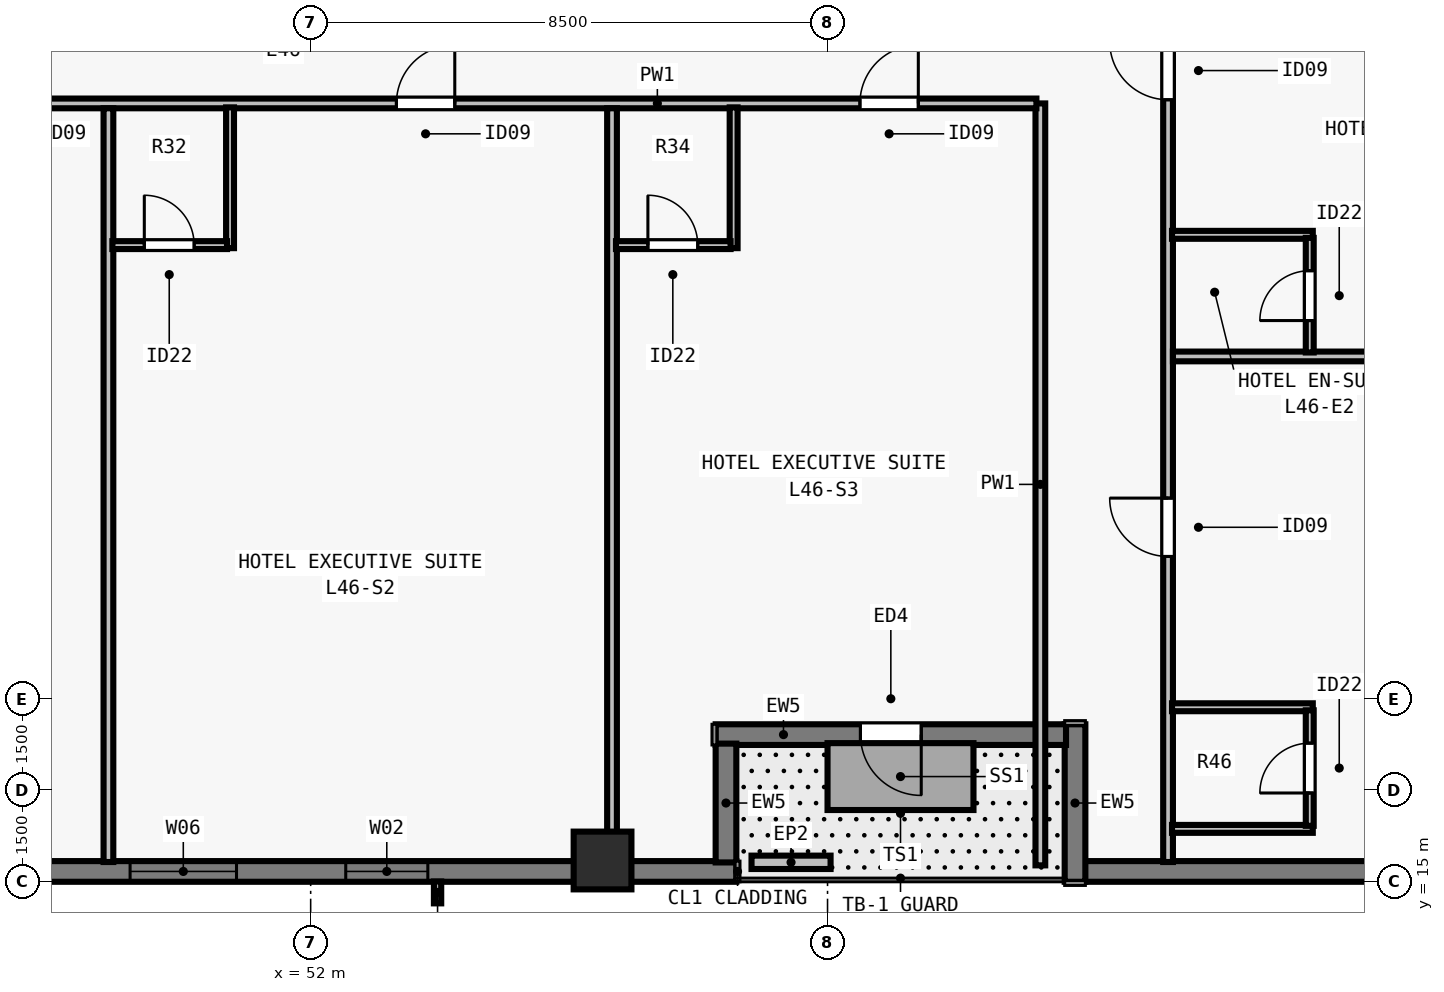
"""IFC4 building model, lengths in metres.
Left out: names, types, materials, properties, quantities, classifications, styles, units other than length and angle.
Written with IfcOpenShell. Run it as: python <this file> out.ifc"""

import sys

from ifc_helpers import new_model, si_unit, direction, frame, frame_2d, origin, origin_2d, place, context, subcontext, project, spatial, rectangle, extrude, element, fill, save


model = new_model("IFC4")
c1 = context("Model", 3, precision=1e-05, world=origin(), true_north=direction((0.0, 1.0)))
c2 = subcontext(c1, "Body", "Model", "MODEL_VIEW")
j1 = project(units=[si_unit("LENGTHUNIT", "METRE"), si_unit("PLANEANGLEUNIT", "RADIAN")], contexts=[c1])
p1 = place(None, origin())
s1 = spatial("IfcSite", under=j1, at=p1, CompositionType="ELEMENT")
p2 = place(p1, origin())
s2 = spatial("IfcBuilding", under=s1, at=p2, CompositionType="ELEMENT")
p3 = place(p2, frame((0.0, 0.0, 169.0)))
s3 = spatial("IfcBuildingStorey", under=s2, at=p3, CompositionType="ELEMENT", Elevation=169.0)
p4 = place(p3, frame((56.8, 15.35, 0.0), z_axis=(0.0, 0.0, 1.0), x_axis=(1.0, 0.0, 0.0)))
e1 = element("IfcColumn", 1, at=p4, inside=s3, PredefinedType="COLUMN", context=c2, shape_type="SweptSolid", body=[
    extrude(rectangle(XDim=0.95, YDim=0.95, at=origin_2d()), origin(), (0.0, 0.0, 1.0), 3.5),
])
p5 = place(p3, frame((59.0, 15.17, 0.0), z_axis=(0.0, 0.0, 1.0), x_axis=(-1.0, 0.0, 0.0)))
e2 = element("IfcWall", 2, at=p5, inside=s3, PredefinedType="SOLIDWALL", context=c2, shape_type="SweptSolid", body=[
    extrude(rectangle(XDim=26.682, YDim=0.34, at=frame_2d((13.341, 0.0))), origin(), (0.0, 0.0, 1.0), 3.28),
])
p6 = place(p5, frame((5.073, 0.0, 0.8)))
e3 = element("IfcOpeningElement", 3, at=p6, cuts=e2, PredefinedType="OPENING", context=c2, shape_type="SweptSolid", body=[
    extrude(rectangle(XDim=1.35, YDim=1.66, at=frame_2d((0.675, 0.83))), frame((0.0, 0.18, 0.0), z_axis=(0.0, -1.0, 0.0), x_axis=(1.0, 0.0, 0.0)), (0.0, 0.0, 1.0), 0.36),
])
p7 = place(p5, frame((8.219, 0.0, 0.8)))
e4 = element("IfcOpeningElement", 4, at=p7, cuts=e2, PredefinedType="OPENING", context=c2, shape_type="SweptSolid", body=[
    extrude(rectangle(XDim=1.75, YDim=1.66, at=frame_2d((0.875, 0.83))), frame((0.0, 0.18, 0.0), z_axis=(0.0, -1.0, 0.0), x_axis=(1.0, 0.0, 0.0)), (0.0, 0.0, 1.0), 0.36),
])
p8 = place(p5, frame((12.666, 0.0, 0.8)))
e5 = element("IfcOpeningElement", 5, at=p8, cuts=e2, PredefinedType="OPENING", context=c2, shape_type="SweptSolid", body=[
    extrude(rectangle(XDim=1.35, YDim=1.66, at=frame_2d((0.675, 0.83))), frame((0.0, 0.18, 0.0), z_axis=(0.0, -1.0, 0.0), x_axis=(1.0, 0.0, 0.0)), (0.0, 0.0, 1.0), 0.36),
])
p9 = place(p5, frame((15.012, 0.0, 0.8)))
e6 = element("IfcOpeningElement", 6, at=p9, cuts=e2, PredefinedType="OPENING", context=c2, shape_type="SweptSolid", body=[
    extrude(rectangle(XDim=1.75, YDim=1.66, at=frame_2d((0.875, 0.83))), frame((0.0, 0.18, 0.0), z_axis=(0.0, -1.0, 0.0), x_axis=(1.0, 0.0, 0.0)), (0.0, 0.0, 1.0), 0.36),
])
p10 = place(p5, frame((19.809, 0.0, 0.8)))
e7 = element("IfcOpeningElement", 7, at=p10, cuts=e2, PredefinedType="OPENING", context=c2, shape_type="SweptSolid", body=[
    extrude(rectangle(XDim=1.35, YDim=1.66, at=frame_2d((0.675, 0.83))), frame((0.0, 0.18, 0.0), z_axis=(0.0, -1.0, 0.0), x_axis=(1.0, 0.0, 0.0)), (0.0, 0.0, 1.0), 0.36),
])
p11 = place(p3, frame((72.0, 15.17, 0.0), z_axis=(0.0, 0.0, 1.0), x_axis=(-1.0, 0.0, 0.0)))
e8 = element("IfcWall", 8, at=p11, inside=s3, PredefinedType="SOLIDWALL", context=c2, shape_type="SweptSolid", body=[
    extrude(rectangle(XDim=7.282, YDim=0.34, at=frame_2d((3.641, 0.0))), origin(), (0.0, 0.0, 1.0), 3.28),
])
p12 = place(p3, frame((64.57, 15.0, 0.0), z_axis=(0.0, 0.0, 1.0), x_axis=(0.0, 1.0, 0.0)))
e9 = element("IfcWall", 9, at=p12, inside=s3, PredefinedType="SOLIDWALL", context=c2, shape_type="SweptSolid", body=[
    extrude(rectangle(XDim=2.59, YDim=0.34, at=frame_2d((1.295, 0.0))), origin(), (0.0, 0.0, 1.0), 3.28),
])
p13 = place(p3, frame((64.422, 17.42, 0.0), z_axis=(0.0, 0.0, 1.0), x_axis=(-1.0, 0.0, 0.0)))
e10 = element("IfcWall", 10, at=p13, inside=s3, PredefinedType="SOLIDWALL", context=c2, shape_type="SweptSolid", body=[
    extrude(rectangle(XDim=5.762, YDim=0.34, at=frame_2d((2.881, 0.0))), origin(), (0.0, 0.0, 1.0), 3.28),
])
p14 = place(p13, frame((2.381, 0.0, 0.0)))
e11 = element("IfcOpeningElement", 11, at=p14, cuts=e10, PredefinedType="OPENING", context=c2, shape_type="SweptSolid", body=[
    extrude(rectangle(XDim=1.0, YDim=2.15, at=frame_2d((0.5, 1.075))), frame((0.0, 0.18, 0.0), z_axis=(0.0, -1.0, 0.0), x_axis=(1.0, 0.0, 0.0)), (0.0, 0.0, 1.0), 0.36),
])
p15 = place(p3, frame((58.83, 17.272, 0.0), z_axis=(0.0, 0.0, 1.0), x_axis=(0.0, -1.0, 0.0)))
e12 = element("IfcWall", 12, at=p15, inside=s3, PredefinedType="SOLIDWALL", context=c2, shape_type="SweptSolid", body=[
    extrude(rectangle(XDim=1.954, YDim=0.34, at=frame_2d((0.977, 0.0))), origin(), (0.0, 0.0, 1.0), 3.28),
])
p16 = place(p3, frame((59.25, 15.32, 0.0), z_axis=(0.0, 0.0, 1.0), x_axis=(1.0, 0.0, 0.0)))
e13 = element("IfcWall", 13, at=p16, inside=s3, PredefinedType="PARAPET", context=c2, shape_type="SweptSolid", body=[
    extrude(rectangle(XDim=1.3, YDim=0.22, at=frame_2d((0.65, 0.0))), origin(), (0.0, 0.0, 1.0), 0.55),
])
p17 = place(p3, frame((66.1, 15.325, 0.0), z_axis=(0.0, 0.0, 1.0), x_axis=(0.0, 1.0, 0.0)))
e14 = element("IfcWall", 14, at=p17, inside=s3, PredefinedType="PARTITIONING", context=c2, shape_type="SweptSolid", body=[
    extrude(rectangle(XDim=47.35, YDim=0.16, at=frame_2d((23.675, 0.0))), origin(), (0.0, 0.0, 1.0), 2.555),
])
p18 = place(p17, frame((5.025, 0.0, 0.0)))
e15 = element("IfcOpeningElement", 15, at=p18, cuts=e14, PredefinedType="OPENING", context=c2, shape_type="SweptSolid", body=[
    extrude(rectangle(XDim=0.96, YDim=2.15, at=frame_2d((0.48, 1.075))), frame((0.0, 0.09, 0.0), z_axis=(0.0, -1.0, 0.0), x_axis=(1.0, 0.0, 0.0)), (0.0, 0.0, 1.0), 0.18),
])
p19 = place(p17, frame((12.535, 0.0, 0.0)))
e16 = element("IfcOpeningElement", 16, at=p19, cuts=e14, PredefinedType="OPENING", context=c2, shape_type="SweptSolid", body=[
    extrude(rectangle(XDim=0.96, YDim=2.15, at=frame_2d((0.48, 1.075))), frame((0.0, 0.09, 0.0), z_axis=(0.0, -1.0, 0.0), x_axis=(1.0, 0.0, 0.0)), (0.0, 0.0, 1.0), 0.18),
])
p20 = place(p17, frame((20.395, 0.0, 0.0)))
e17 = element("IfcOpeningElement", 17, at=p20, cuts=e14, PredefinedType="OPENING", context=c2, shape_type="SweptSolid", body=[
    extrude(rectangle(XDim=0.96, YDim=2.15, at=frame_2d((0.48, 1.075))), frame((0.0, 0.09, 0.0), z_axis=(0.0, -1.0, 0.0), x_axis=(1.0, 0.0, 0.0)), (0.0, 0.0, 1.0), 0.18),
])
p21 = place(p17, frame((28.255, 0.0, 0.0)))
e18 = element("IfcOpeningElement", 18, at=p21, cuts=e14, PredefinedType="OPENING", context=c2, shape_type="SweptSolid", body=[
    extrude(rectangle(XDim=0.96, YDim=2.15, at=frame_2d((0.48, 1.075))), frame((0.0, 0.09, 0.0), z_axis=(0.0, -1.0, 0.0), x_axis=(1.0, 0.0, 0.0)), (0.0, 0.0, 1.0), 0.18),
])
p22 = place(p17, frame((36.115, 0.0, 0.0)))
e19 = element("IfcOpeningElement", 19, at=p22, cuts=e14, PredefinedType="OPENING", context=c2, shape_type="SweptSolid", body=[
    extrude(rectangle(XDim=0.96, YDim=2.15, at=frame_2d((0.48, 1.075))), frame((0.0, 0.09, 0.0), z_axis=(0.0, -1.0, 0.0), x_axis=(1.0, 0.0, 0.0)), (0.0, 0.0, 1.0), 0.18),
])
p23 = place(p17, frame((44.1, 0.0, 0.0)))
e20 = element("IfcOpeningElement", 20, at=p23, cuts=e14, PredefinedType="OPENING", context=c2, shape_type="SweptSolid", body=[
    extrude(rectangle(XDim=0.96, YDim=2.15, at=frame_2d((0.48, 1.075))), frame((0.0, 0.09, 0.0), z_axis=(0.0, -1.0, 0.0), x_axis=(1.0, 0.0, 0.0)), (0.0, 0.0, 1.0), 0.18),
])
p24 = place(p3, frame((64.0, 15.27, 0.0), z_axis=(0.0, 0.0, 1.0), x_axis=(0.0, 1.0, 0.0)))
e21 = element("IfcWall", 21, at=p24, inside=s3, PredefinedType="PARTITIONING", context=c2, shape_type="SweptSolid", body=[
    extrude(rectangle(XDim=12.53, YDim=0.16, at=frame_2d((6.265, 0.0))), origin(), (0.0, 0.0, 1.0), 2.555),
])
p25 = place(p3, frame((41.865, 27.8, 0.0), z_axis=(0.0, 0.0, 1.0), x_axis=(1.0, 0.0, 0.0)))
e22 = element("IfcWall", 22, at=p25, inside=s3, PredefinedType="PARTITIONING", context=c2, shape_type="SweptSolid", body=[
    extrude(rectangle(XDim=22.07, YDim=0.16, at=frame_2d((11.035, 0.0))), origin(), (0.0, 0.0, 1.0), 3.28),
])
p26 = place(p25, frame((4.232, 0.0, 0.0)))
e23 = element("IfcOpeningElement", 23, at=p26, cuts=e22, PredefinedType="OPENING", context=c2, shape_type="SweptSolid", body=[
    extrude(rectangle(XDim=0.96, YDim=2.15, at=frame_2d((0.48, 1.075))), frame((0.0, 0.09, 0.0), z_axis=(0.0, -1.0, 0.0), x_axis=(1.0, 0.0, 0.0)), (0.0, 0.0, 1.0), 0.18),
])
p27 = place(p25, frame((11.545, 0.0, 0.0)))
e24 = element("IfcOpeningElement", 24, at=p27, cuts=e22, PredefinedType="OPENING", context=c2, shape_type="SweptSolid", body=[
    extrude(rectangle(XDim=0.96, YDim=2.15, at=frame_2d((0.48, 1.075))), frame((0.0, 0.09, 0.0), z_axis=(0.0, -1.0, 0.0), x_axis=(1.0, 0.0, 0.0)), (0.0, 0.0, 1.0), 0.18),
])
p28 = place(p25, frame((19.168, 0.0, 0.0)))
e25 = element("IfcOpeningElement", 25, at=p28, cuts=e22, PredefinedType="OPENING", context=c2, shape_type="SweptSolid", body=[
    extrude(rectangle(XDim=0.96, YDim=2.15, at=frame_2d((0.48, 1.075))), frame((0.0, 0.09, 0.0), z_axis=(0.0, -1.0, 0.0), x_axis=(1.0, 0.0, 0.0)), (0.0, 0.0, 1.0), 0.18),
])
p29 = place(p3, frame((48.674, 15.325, 0.0), z_axis=(0.0, 0.0, 1.0), x_axis=(0.0, 1.0, 0.0)))
e26 = element("IfcWall", 26, at=p29, inside=s3, PredefinedType="PARTITIONING", context=c2, shape_type="SweptSolid", body=[
    extrude(rectangle(XDim=12.395, YDim=0.16, at=frame_2d((6.198, 0.0))), origin(), (0.0, 0.0, 1.0), 2.896),
])
p30 = place(p3, frame((50.674, 25.42, 0.0), z_axis=(0.0, 0.0, 1.0), x_axis=(0.0, 1.0, 0.0)))
e27 = element("IfcWall", 27, at=p30, inside=s3, PredefinedType="PLUMBINGWALL", context=c2, shape_type="SweptSolid", body=[
    extrude(rectangle(XDim=2.315, YDim=0.13, at=frame_2d((1.158, 0.0))), origin(), (0.0, 0.0, 1.0), 3.28),
])
p31 = place(p3, frame((48.739, 25.47, 0.0), z_axis=(0.0, 0.0, 1.0), x_axis=(1.0, 0.0, 0.0)))
e28 = element("IfcWall", 28, at=p31, inside=s3, PredefinedType="PLUMBINGWALL", context=c2, shape_type="SweptSolid", body=[
    extrude(rectangle(XDim=1.885, YDim=0.13, at=frame_2d((0.942, 0.0))), origin(), (0.0, 0.0, 1.0), 3.28),
])
p32 = place(p31, frame((0.525, 0.0, 0.0)))
e29 = element("IfcOpeningElement", 29, at=p32, cuts=e28, PredefinedType="OPENING", context=c2, shape_type="SweptSolid", body=[
    extrude(rectangle(XDim=0.82, YDim=2.1, at=frame_2d((0.41, 1.05))), frame((0.0, 0.075, 0.0), z_axis=(0.0, -1.0, 0.0), x_axis=(1.0, 0.0, 0.0)), (0.0, 0.0, 1.0), 0.15),
])
p33 = place(p3, frame((56.956, 15.325, 0.0), z_axis=(0.0, 0.0, 1.0), x_axis=(0.0, 1.0, 0.0)))
e30 = element("IfcWall", 30, at=p33, inside=s3, PredefinedType="PARTITIONING", context=c2, shape_type="SweptSolid", body=[
    extrude(rectangle(XDim=12.395, YDim=0.16, at=frame_2d((6.198, 0.0))), origin(), (0.0, 0.0, 1.0), 2.555),
])
p34 = place(p3, frame((58.956, 25.42, 0.0), z_axis=(0.0, 0.0, 1.0), x_axis=(0.0, 1.0, 0.0)))
e31 = element("IfcWall", 31, at=p34, inside=s3, PredefinedType="PLUMBINGWALL", context=c2, shape_type="SweptSolid", body=[
    extrude(rectangle(XDim=2.315, YDim=0.13, at=frame_2d((1.158, 0.0))), origin(), (0.0, 0.0, 1.0), 3.28),
])
p35 = place(p3, frame((57.021, 25.47, 0.0), z_axis=(0.0, 0.0, 1.0), x_axis=(1.0, 0.0, 0.0)))
e32 = element("IfcWall", 32, at=p35, inside=s3, PredefinedType="PLUMBINGWALL", context=c2, shape_type="SweptSolid", body=[
    extrude(rectangle(XDim=1.885, YDim=0.13, at=frame_2d((0.942, 0.0))), origin(), (0.0, 0.0, 1.0), 3.28),
])
p36 = place(p35, frame((0.525, 0.0, 0.0)))
e33 = element("IfcOpeningElement", 33, at=p36, cuts=e32, PredefinedType="OPENING", context=c2, shape_type="SweptSolid", body=[
    extrude(rectangle(XDim=0.82, YDim=2.1, at=frame_2d((0.41, 1.05))), frame((0.0, 0.075, 0.0), z_axis=(0.0, -1.0, 0.0), x_axis=(1.0, 0.0, 0.0)), (0.0, 0.0, 1.0), 0.15),
])
for number, where, z_axis, x_axis in (
    (34, (66.165, 15.87, 0.0), (0.0, 0.0, 1.0), (1.0, 0.0, 0.0)),
    (35, (66.165, 17.87, 0.0), (0.0, 0.0, 1.0), (1.0, 0.0, 0.0)),
):
    element("IfcWall", number, at=place(p3, frame(where, z_axis=z_axis, x_axis=x_axis)), inside=s3, PredefinedType="PLUMBINGWALL", context=c2, shape_type="SweptSolid", body=[
        extrude(rectangle(XDim=2.315, YDim=0.13, at=frame_2d((1.157, 0.0))), origin(), (0.0, 0.0, 1.0), 3.28),
    ])
p37 = place(p3, frame((68.43, 15.92, 0.0), z_axis=(0.0, 0.0, 1.0), x_axis=(0.0, 1.0, 0.0)))
e36 = element("IfcWall", 36, at=p37, inside=s3, PredefinedType="PLUMBINGWALL", context=c2, shape_type="SweptSolid", body=[
    extrude(rectangle(XDim=1.9, YDim=0.13, at=frame_2d((0.95, 0.0))), origin(), (0.0, 0.0, 1.0), 3.28),
])
p38 = place(p37, frame((0.54, 0.0, 0.0)))
e37 = element("IfcOpeningElement", 37, at=p38, cuts=e36, PredefinedType="OPENING", context=c2, shape_type="SweptSolid", body=[
    extrude(rectangle(XDim=0.82, YDim=2.1, at=frame_2d((0.41, 1.05))), frame((0.0, 0.075, 0.0), z_axis=(0.0, -1.0, 0.0), x_axis=(1.0, 0.0, 0.0)), (0.0, 0.0, 1.0), 0.15),
])
p39 = place(p3, frame((66.18, 23.639, 0.0), z_axis=(0.0, 0.0, 1.0), x_axis=(1.0, 0.0, 0.0)))
e38 = element("IfcWall", 38, at=p39, inside=s3, PredefinedType="PARTITIONING", context=c2, shape_type="SweptSolid", body=[
    extrude(rectangle(XDim=9.495, YDim=0.16, at=frame_2d((4.748, 0.0))), origin(), (0.0, 0.0, 1.0), 2.896),
])
p40 = place(p3, frame((66.165, 25.639, 0.0), z_axis=(0.0, 0.0, 1.0), x_axis=(1.0, 0.0, 0.0)))
e39 = element("IfcWall", 39, at=p40, inside=s3, PredefinedType="PLUMBINGWALL", context=c2, shape_type="SweptSolid", body=[
    extrude(rectangle(XDim=2.315, YDim=0.13, at=frame_2d((1.157, 0.0))), origin(), (0.0, 0.0, 1.0), 2.896),
])
p41 = place(p3, frame((68.43, 23.704, 0.0), z_axis=(0.0, 0.0, 1.0), x_axis=(0.0, 1.0, 0.0)))
e40 = element("IfcWall", 40, at=p41, inside=s3, PredefinedType="PLUMBINGWALL", context=c2, shape_type="SweptSolid", body=[
    extrude(rectangle(XDim=1.885, YDim=0.13, at=frame_2d((0.942, 0.0))), origin(), (0.0, 0.0, 1.0), 3.28),
])
p42 = place(p41, frame((0.525, 0.0, 0.0)))
e41 = element("IfcOpeningElement", 41, at=p42, cuts=e40, PredefinedType="OPENING", context=c2, shape_type="SweptSolid", body=[
    extrude(rectangle(XDim=0.82, YDim=2.1, at=frame_2d((0.41, 1.05))), frame((0.0, 0.075, 0.0), z_axis=(0.0, -1.0, 0.0), x_axis=(1.0, 0.0, 0.0)), (0.0, 0.0, 1.0), 0.15),
])
p43 = place(p6, origin())
e42 = element("IfcWindow", 42, at=p43, inside=s3, PartitioningType="SINGLE_PANEL", PredefinedType="WINDOW", context=c2, shape_type="SweptSolid", body=[
    extrude(rectangle(XDim=1.35, YDim=1.66, at=frame_2d((0.675, 0.83))), frame((0.0, -0.05, 0.0), z_axis=(0.0, -1.0, 0.0), x_axis=(1.0, 0.0, 0.0)), (0.0, 0.0, 1.0), 0.06),
])
fill(e3, e42)
p44 = place(p7, origin())
e43 = element("IfcWindow", 43, at=p44, inside=s3, PartitioningType="SINGLE_PANEL", PredefinedType="WINDOW", context=c2, shape_type="SweptSolid", body=[
    extrude(rectangle(XDim=1.75, YDim=1.66, at=frame_2d((0.875, 0.83))), frame((0.0, -0.05, 0.0), z_axis=(0.0, -1.0, 0.0), x_axis=(1.0, 0.0, 0.0)), (0.0, 0.0, 1.0), 0.06),
])
fill(e4, e43)
p45 = place(p14, origin())
e44 = element("IfcDoor", 44, at=p45, inside=s3, OperationType="SINGLE_SWING_LEFT", PredefinedType="DOOR", context=c2, shape_type="SweptSolid", body=[
    extrude(rectangle(XDim=1.0, YDim=2.15, at=frame_2d((0.5, 1.075))), frame((0.0, 0.025, 0.0), z_axis=(0.0, -1.0, 0.0), x_axis=(1.0, 0.0, 0.0)), (0.0, 0.0, 1.0), 0.05),
])
fill(e11, e44)
p46 = place(p32, origin())
e45 = element("IfcDoor", 45, at=p46, inside=s3, OperationType="SINGLE_SWING_LEFT", PredefinedType="DOOR", context=c2, shape_type="SweptSolid", body=[
    extrude(rectangle(XDim=0.82, YDim=2.1, at=frame_2d((0.41, 1.05))), frame((0.0, 0.025, 0.0), z_axis=(0.0, -1.0, 0.0), x_axis=(1.0, 0.0, 0.0)), (0.0, 0.0, 1.0), 0.05),
])
fill(e29, e45)
p47 = place(p27, origin())
e46 = element("IfcDoor", 46, at=p47, inside=s3, OperationType="SINGLE_SWING_RIGHT", PredefinedType="DOOR", context=c2, shape_type="SweptSolid", body=[
    extrude(rectangle(XDim=0.96, YDim=2.15, at=frame_2d((0.48, 1.075))), frame((0.0, 0.025, 0.0), z_axis=(0.0, -1.0, 0.0), x_axis=(1.0, 0.0, 0.0)), (0.0, 0.0, 1.0), 0.05),
])
fill(e24, e46)
p48 = place(p36, origin())
e47 = element("IfcDoor", 47, at=p48, inside=s3, OperationType="SINGLE_SWING_LEFT", PredefinedType="DOOR", context=c2, shape_type="SweptSolid", body=[
    extrude(rectangle(XDim=0.82, YDim=2.1, at=frame_2d((0.41, 1.05))), frame((0.0, 0.025, 0.0), z_axis=(0.0, -1.0, 0.0), x_axis=(1.0, 0.0, 0.0)), (0.0, 0.0, 1.0), 0.05),
])
fill(e33, e47)
p49 = place(p28, origin())
e48 = element("IfcDoor", 48, at=p49, inside=s3, OperationType="SINGLE_SWING_RIGHT", PredefinedType="DOOR", context=c2, shape_type="SweptSolid", body=[
    extrude(rectangle(XDim=0.96, YDim=2.15, at=frame_2d((0.48, 1.075))), frame((0.0, 0.025, 0.0), z_axis=(0.0, -1.0, 0.0), x_axis=(1.0, 0.0, 0.0)), (0.0, 0.0, 1.0), 0.05),
])
fill(e25, e48)
p50 = place(p38, origin())
e49 = element("IfcDoor", 49, at=p50, inside=s3, OperationType="SINGLE_SWING_LEFT", PredefinedType="DOOR", context=c2, shape_type="SweptSolid", body=[
    extrude(rectangle(XDim=0.82, YDim=2.1, at=frame_2d((0.41, 1.05))), frame((0.0, 0.025, 0.0), z_axis=(0.0, -1.0, 0.0), x_axis=(1.0, 0.0, 0.0)), (0.0, 0.0, 1.0), 0.05),
])
fill(e37, e49)
p51 = place(p18, origin())
e50 = element("IfcDoor", 50, at=p51, inside=s3, OperationType="SINGLE_SWING_RIGHT", PredefinedType="DOOR", context=c2, shape_type="SweptSolid", body=[
    extrude(rectangle(XDim=0.96, YDim=2.15, at=frame_2d((0.48, 1.075))), frame((0.0, 0.025, 0.0), z_axis=(0.0, -1.0, 0.0), x_axis=(1.0, 0.0, 0.0)), (0.0, 0.0, 1.0), 0.05),
])
fill(e15, e50)
p52 = place(p42, origin())
e51 = element("IfcDoor", 51, at=p52, inside=s3, OperationType="SINGLE_SWING_LEFT", PredefinedType="DOOR", context=c2, shape_type="SweptSolid", body=[
    extrude(rectangle(XDim=0.82, YDim=2.1, at=frame_2d((0.41, 1.05))), frame((0.0, 0.025, 0.0), z_axis=(0.0, -1.0, 0.0), x_axis=(1.0, 0.0, 0.0)), (0.0, 0.0, 1.0), 0.05),
])
fill(e41, e51)
p53 = place(p19, origin())
e52 = element("IfcDoor", 52, at=p53, inside=s3, OperationType="SINGLE_SWING_RIGHT", PredefinedType="DOOR", context=c2, shape_type="SweptSolid", body=[
    extrude(rectangle(XDim=0.96, YDim=2.15, at=frame_2d((0.48, 1.075))), frame((0.0, 0.025, 0.0), z_axis=(0.0, -1.0, 0.0), x_axis=(1.0, 0.0, 0.0)), (0.0, 0.0, 1.0), 0.05),
])
fill(e16, e52)
save(model, sys.argv[1])
